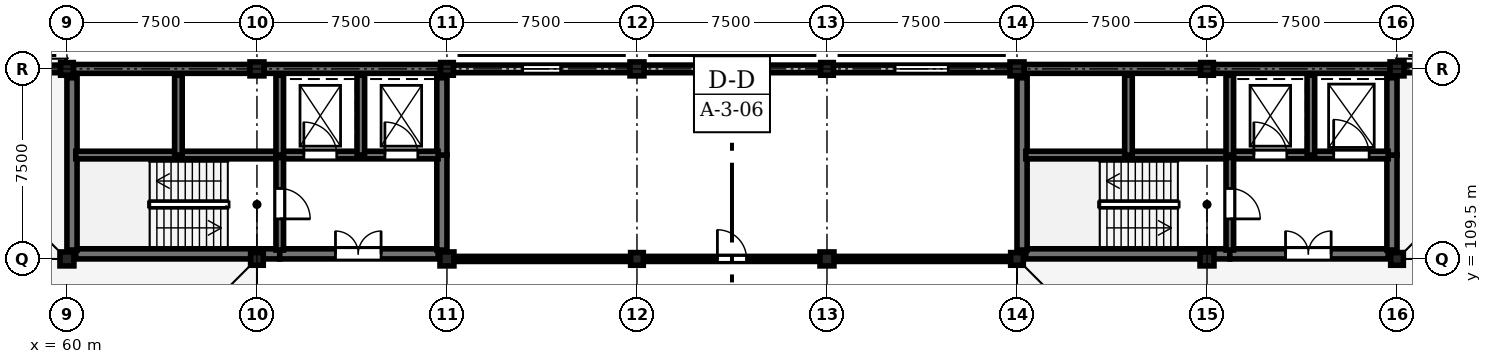
"""IFC4 building model, lengths in metres.
Left out: names, types, materials, properties, quantities, classifications, styles, units other than length and angle.
Written with IfcOpenShell. Run it as: python <this file> out.ifc"""

import sys

from ifc_helpers import new_model, si_unit, direction, frame, frame_2d, origin, origin_2d, place, context, subcontext, project, spatial, rectangle, extrude, element, fill, save


model = new_model("IFC4")
c1 = context("Model", 3, precision=1e-05, world=origin(), true_north=direction((0.0, 1.0)))
c2 = subcontext(c1, "Body", "Model", "MODEL_VIEW")
j1 = project(units=[si_unit("LENGTHUNIT", "METRE"), si_unit("PLANEANGLEUNIT", "RADIAN")], contexts=[c1])
p1 = place(None, origin())
s1 = spatial("IfcSite", under=j1, at=p1, CompositionType="ELEMENT")
p2 = place(p1, origin())
s2 = spatial("IfcBuilding", under=s1, at=p2, CompositionType="ELEMENT")
p3 = place(p2, frame((0.0, 0.0, 17.85)))
s3 = spatial("IfcBuildingStorey", under=s2, at=p3, CompositionType="ELEMENT", Elevation=17.85)
p4 = place(p3, frame((60.0, 109.5, 0.0), z_axis=(0.0, 0.0, 1.0), x_axis=(1.0, 0.0, 0.0)))
e1 = element("IfcColumn", 1, at=p4, inside=s3, PredefinedType="COLUMN", context=c2, shape_type="SweptSolid", body=[
    extrude(rectangle(XDim=0.55, YDim=0.55, at=origin_2d()), origin(), (0.0, 0.0, 1.0), 4.05),
])
for number, where, z_axis, x_axis in (
    (2, (60.0, 117.0, 0.0), (0.0, 0.0, 1.0), (1.0, 0.0, 0.0)),
    (3, (67.5, 109.5, 0.0), (0.0, 0.0, 1.0), (1.0, 0.0, 0.0)),
):
    element("IfcColumn", number, at=place(p3, frame(where, z_axis=z_axis, x_axis=x_axis)), inside=s3, PredefinedType="COLUMN", context=c2, shape_type="SweptSolid", body=[
        extrude(rectangle(XDim=0.5, YDim=0.5, at=origin_2d()), origin(), (0.0, 0.0, 1.0), 4.05),
    ])
for number, where, z_axis, x_axis in (
    (4, (67.5, 117.0, 0.0), (0.0, 0.0, 1.0), (1.0, 0.0, 0.0)),
    (5, (75.0, 109.5, 0.0), (0.0, 0.0, 1.0), (1.0, 0.0, 0.0)),
):
    element("IfcColumn", number, at=place(p3, frame(where, z_axis=z_axis, x_axis=x_axis)), inside=s3, PredefinedType="COLUMN", context=c2, shape_type="SweptSolid", body=[
        extrude(rectangle(XDim=0.55, YDim=0.55, at=origin_2d()), origin(), (0.0, 0.0, 1.0), 4.05),
    ])
for number, where, z_axis, x_axis in (
    (6, (75.0, 117.0, 0.0), (0.0, 0.0, 1.0), (1.0, 0.0, 0.0)),
    (7, (82.5, 109.5, 0.0), (0.0, 0.0, 1.0), (1.0, 0.0, 0.0)),
):
    element("IfcColumn", number, at=place(p3, frame(where, z_axis=z_axis, x_axis=x_axis)), inside=s3, PredefinedType="COLUMN", context=c2, shape_type="SweptSolid", body=[
        extrude(rectangle(XDim=0.5, YDim=0.5, at=origin_2d()), origin(), (0.0, 0.0, 1.0), 4.05),
    ])
for number, where, z_axis, x_axis in (
    (8, (82.5, 117.0, 0.0), (0.0, 0.0, 1.0), (1.0, 0.0, 0.0)),
    (9, (90.0, 109.5, 0.0), (0.0, 0.0, 1.0), (1.0, 0.0, 0.0)),
):
    element("IfcColumn", number, at=place(p3, frame(where, z_axis=z_axis, x_axis=x_axis)), inside=s3, PredefinedType="COLUMN", context=c2, shape_type="SweptSolid", body=[
        extrude(rectangle(XDim=0.55, YDim=0.55, at=origin_2d()), origin(), (0.0, 0.0, 1.0), 4.05),
    ])
for number, where, z_axis, x_axis in (
    (10, (90.0, 117.0, 0.0), (0.0, 0.0, 1.0), (1.0, 0.0, 0.0)),
    (11, (97.5, 109.5, 0.0), (0.0, 0.0, 1.0), (1.0, 0.0, 0.0)),
):
    element("IfcColumn", number, at=place(p3, frame(where, z_axis=z_axis, x_axis=x_axis)), inside=s3, PredefinedType="COLUMN", context=c2, shape_type="SweptSolid", body=[
        extrude(rectangle(XDim=0.5, YDim=0.5, at=origin_2d()), origin(), (0.0, 0.0, 1.0), 4.05),
    ])
for number, where, z_axis, x_axis in (
    (12, (97.5, 117.0, 0.0), (0.0, 0.0, 1.0), (1.0, 0.0, 0.0)),
    (13, (105.0, 109.5, 0.0), (0.0, 0.0, 1.0), (1.0, 0.0, 0.0)),
):
    element("IfcColumn", number, at=place(p3, frame(where, z_axis=z_axis, x_axis=x_axis)), inside=s3, PredefinedType="COLUMN", context=c2, shape_type="SweptSolid", body=[
        extrude(rectangle(XDim=0.55, YDim=0.55, at=origin_2d()), origin(), (0.0, 0.0, 1.0), 4.05),
    ])
for number, where, z_axis, x_axis in (
    (14, (105.0, 117.0, 0.0), (0.0, 0.0, 1.0), (1.0, 0.0, 0.0)),
    (15, (112.5, 109.5, 0.0), (0.0, 0.0, 1.0), (1.0, 0.0, 0.0)),
):
    element("IfcColumn", number, at=place(p3, frame(where, z_axis=z_axis, x_axis=x_axis)), inside=s3, PredefinedType="COLUMN", context=c2, shape_type="SweptSolid", body=[
        extrude(rectangle(XDim=0.5, YDim=0.5, at=origin_2d()), origin(), (0.0, 0.0, 1.0), 4.05),
    ])
p5 = place(p3, frame((112.5, 117.0, 0.0), z_axis=(0.0, 0.0, 1.0), x_axis=(1.0, 0.0, 0.0)))
e16 = element("IfcColumn", 16, at=p5, inside=s3, PredefinedType="COLUMN", context=c2, shape_type="SweptSolid", body=[
    extrude(rectangle(XDim=0.55, YDim=0.55, at=origin_2d()), origin(), (0.0, 0.0, 1.0), 4.05),
])
p6 = place(p3, frame((52.735, 117.0, 0.0), z_axis=(0.0, 0.0, 1.0), x_axis=(1.0, 0.0, 0.0)))
e17 = element("IfcWall", 17, at=p6, inside=s3, PredefinedType="STANDARD", context=c2, shape_type="SweptSolid", body=[
    extrude(rectangle(XDim=7.005, YDim=0.3, at=frame_2d((3.502, 0.0))), origin(), (0.0, 0.0, 1.0), 3.77),
])
p7 = place(p6, frame((2.452, 0.0, 0.9)))
e18 = element("IfcOpeningElement", 18, at=p7, cuts=e17, PredefinedType="OPENING", context=c2, shape_type="SweptSolid", body=[
    extrude(rectangle(XDim=2.1, YDim=2.4, at=frame_2d((1.05, 1.2))), frame((0.0, 0.16, 0.0), z_axis=(0.0, -1.0, 0.0), x_axis=(1.0, 0.0, 0.0)), (0.0, 0.0, 1.0), 0.32),
])
for number, where, z_axis, x_axis in (
    (19, (60.26, 117.0, 0.0), (0.0, 0.0, 1.0), (1.0, 0.0, 0.0)),
    (20, (67.785, 117.0, 0.0), (0.0, 0.0, 1.0), (1.0, 0.0, 0.0)),
):
    element("IfcWall", number, at=place(p3, frame(where, z_axis=z_axis, x_axis=x_axis)), inside=s3, PredefinedType="SHEAR", context=c2, shape_type="SweptSolid", body=[
        extrude(rectangle(XDim=6.955, YDim=0.35, at=frame_2d((3.478, 0.0))), origin(), (0.0, 0.0, 1.0), 3.77),
    ])
p8 = place(p3, frame((75.26, 117.0, 0.0), z_axis=(0.0, 0.0, 1.0), x_axis=(1.0, 0.0, 0.0)))
e21 = element("IfcWall", 21, at=p8, inside=s3, PredefinedType="STANDARD", context=c2, shape_type="SweptSolid", body=[
    extrude(rectangle(XDim=6.955, YDim=0.3, at=frame_2d((3.478, 0.0))), origin(), (0.0, 0.0, 1.0), 3.17),
])
p9 = place(p8, frame((2.728, 0.0, 0.9)))
e22 = element("IfcOpeningElement", 22, at=p9, cuts=e21, PredefinedType="OPENING", context=c2, shape_type="SweptSolid", body=[
    extrude(rectangle(XDim=1.5, YDim=1.99, at=frame_2d((0.75, 0.995))), frame((0.0, 0.16, 0.0), z_axis=(0.0, -1.0, 0.0), x_axis=(1.0, 0.0, 0.0)), (0.0, 0.0, 1.0), 0.32),
])
p10 = place(p3, frame((82.785, 117.0, 0.0), z_axis=(0.0, 0.0, 1.0), x_axis=(1.0, 0.0, 0.0)))
e23 = element("IfcWall", 23, at=p10, inside=s3, PredefinedType="STANDARD", context=c2, shape_type="SweptSolid", body=[
    extrude(rectangle(XDim=6.955, YDim=0.3, at=frame_2d((3.478, 0.0))), origin(), (0.0, 0.0, 1.0), 3.17),
])
p11 = place(p10, frame((2.877, 0.0, 0.9)))
e24 = element("IfcOpeningElement", 24, at=p11, cuts=e23, PredefinedType="OPENING", context=c2, shape_type="SweptSolid", body=[
    extrude(rectangle(XDim=1.2, YDim=1.99, at=frame_2d((0.6, 0.995))), frame((0.0, 0.16, 0.0), z_axis=(0.0, -1.0, 0.0), x_axis=(1.0, 0.0, 0.0)), (0.0, 0.0, 1.0), 0.32),
])
p12 = place(p3, frame((90.26, 117.0, 0.0), z_axis=(0.0, 0.0, 1.0), x_axis=(1.0, 0.0, 0.0)))
e25 = element("IfcWall", 25, at=p12, inside=s3, PredefinedType="STANDARD", context=c2, shape_type="SweptSolid", body=[
    extrude(rectangle(XDim=6.955, YDim=0.3, at=frame_2d((3.478, 0.0))), origin(), (0.0, 0.0, 1.0), 3.17),
])
p13 = place(p12, frame((2.427, 0.0, 0.9)))
e26 = element("IfcOpeningElement", 26, at=p13, cuts=e25, PredefinedType="OPENING", context=c2, shape_type="SweptSolid", body=[
    extrude(rectangle(XDim=2.1, YDim=1.99, at=frame_2d((1.05, 0.995))), frame((0.0, 0.16, 0.0), z_axis=(0.0, -1.0, 0.0), x_axis=(1.0, 0.0, 0.0)), (0.0, 0.0, 1.0), 0.32),
])
for number, where, z_axis, x_axis in (
    (27, (97.785, 117.0, 0.0), (0.0, 0.0, 1.0), (1.0, 0.0, 0.0)),
    (28, (105.26, 117.0, 0.0), (0.0, 0.0, 1.0), (1.0, 0.0, 0.0)),
):
    element("IfcWall", number, at=place(p3, frame(where, z_axis=z_axis, x_axis=x_axis)), inside=s3, PredefinedType="SHEAR", context=c2, shape_type="SweptSolid", body=[
        extrude(rectangle(XDim=6.955, YDim=0.35, at=frame_2d((3.478, 0.0))), origin(), (0.0, 0.0, 1.0), 3.77),
    ])
p14 = place(p3, frame((112.785, 117.0, 0.0), z_axis=(0.0, 0.0, 1.0), x_axis=(1.0, 0.0, 0.0)))
e29 = element("IfcWall", 29, at=p14, inside=s3, PredefinedType="STANDARD", context=c2, shape_type="SweptSolid", body=[
    extrude(rectangle(XDim=6.98, YDim=0.3, at=frame_2d((3.49, 0.0))), origin(), (0.0, 0.0, 1.0), 3.77),
])
p15 = place(p14, frame((2.59, 0.0, 0.9)))
e30 = element("IfcOpeningElement", 30, at=p15, cuts=e29, PredefinedType="OPENING", context=c2, shape_type="SweptSolid", body=[
    extrude(rectangle(XDim=1.8, YDim=1.95, at=frame_2d((0.9, 0.975))), frame((0.0, 0.16, 0.0), z_axis=(0.0, -1.0, 0.0), x_axis=(1.0, 0.0, 0.0)), (0.0, 0.0, 1.0), 0.32),
])
p16 = place(p3, frame((60.35, 109.7, 0.0), z_axis=(0.0, 0.0, 1.0), x_axis=(1.0, 0.0, 0.0)))
e31 = element("IfcWall", 31, at=p16, inside=s3, PredefinedType="SHEAR", context=c2, shape_type="SweptSolid", body=[
    extrude(rectangle(XDim=8.05, YDim=0.4, at=frame_2d((4.025, 0.0))), origin(), (0.0, 0.0, 1.0), 3.77),
])
p17 = place(p3, frame((68.4, 109.7, 0.0), z_axis=(0.0, 0.0, 1.0), x_axis=(1.0, 0.0, 0.0)))
e32 = element("IfcWall", 32, at=p17, inside=s3, PredefinedType="SHEAR", context=c2, shape_type="SweptSolid", body=[
    extrude(rectangle(XDim=6.25, YDim=0.4, at=frame_2d((3.125, 0.0))), origin(), (0.0, 0.0, 1.0), 3.77),
])
p18 = place(p17, frame((2.2, 0.0, 0.0)))
e33 = element("IfcOpeningElement", 33, at=p18, cuts=e32, PredefinedType="OPENING", context=c2, shape_type="SweptSolid", body=[
    extrude(rectangle(XDim=1.8, YDim=2.25, at=frame_2d((0.9, 1.125))), frame((0.0, 0.21, 0.0), z_axis=(0.0, -1.0, 0.0), x_axis=(1.0, 0.0, 0.0)), (0.0, 0.0, 1.0), 0.42),
])
p19 = place(p3, frame((60.2, 109.85, 0.0), z_axis=(0.0, 0.0, 1.0), x_axis=(0.0, 1.0, 0.0)))
e34 = element("IfcWall", 34, at=p19, inside=s3, PredefinedType="SHEAR", context=c2, shape_type="SweptSolid", body=[
    extrude(rectangle(XDim=6.8, YDim=0.4, at=frame_2d((3.4, 0.0))), origin(), (0.0, 0.0, 1.0), 3.77),
])
p20 = place(p3, frame((74.8, 109.85, 0.0), z_axis=(0.0, 0.0, 1.0), x_axis=(0.0, 1.0, 0.0)))
e35 = element("IfcWall", 35, at=p20, inside=s3, PredefinedType="SHEAR", context=c2, shape_type="SweptSolid", body=[
    extrude(rectangle(XDim=3.75, YDim=0.4, at=frame_2d((1.875, 0.0))), origin(), (0.0, 0.0, 1.0), 3.77),
])
p21 = place(p3, frame((74.8, 113.6, 0.0), z_axis=(0.0, 0.0, 1.0), x_axis=(0.0, 1.0, 0.0)))
e36 = element("IfcWall", 36, at=p21, inside=s3, PredefinedType="SHEAR", context=c2, shape_type="SweptSolid", body=[
    extrude(rectangle(XDim=3.05, YDim=0.4, at=frame_2d((1.525, 0.0))), origin(), (0.0, 0.0, 1.0), 3.77),
])
p22 = place(p3, frame((60.35, 113.6, 0.0), z_axis=(0.0, 0.0, 1.0), x_axis=(1.0, 0.0, 0.0)))
e37 = element("IfcWall", 37, at=p22, inside=s3, PredefinedType="SHEAR", context=c2, shape_type="SweptSolid", body=[
    extrude(rectangle(XDim=8.05, YDim=0.3, at=frame_2d((4.025, 0.0))), origin(), (0.0, 0.0, 1.0), 3.77),
])
p23 = place(p3, frame((68.4, 113.6, 0.0), z_axis=(0.0, 0.0, 1.0), x_axis=(1.0, 0.0, 0.0)))
e38 = element("IfcWall", 38, at=p23, inside=s3, PredefinedType="SHEAR", context=c2, shape_type="SweptSolid", body=[
    extrude(rectangle(XDim=6.25, YDim=0.3, at=frame_2d((3.125, 0.0))), origin(), (0.0, 0.0, 1.0), 3.77),
])
p24 = place(p23, frame((0.95, 0.0, 0.0)))
e39 = element("IfcOpeningElement", 39, at=p24, cuts=e38, PredefinedType="OPENING", context=c2, shape_type="SweptSolid", body=[
    extrude(rectangle(XDim=1.3, YDim=2.2, at=frame_2d((0.65, 1.1))), frame((0.0, 0.16, 0.0), z_axis=(0.0, -1.0, 0.0), x_axis=(1.0, 0.0, 0.0)), (0.0, 0.0, 1.0), 0.32),
])
p25 = place(p23, frame((4.15, 0.0, 0.0)))
e40 = element("IfcOpeningElement", 40, at=p25, cuts=e38, PredefinedType="OPENING", context=c2, shape_type="SweptSolid", body=[
    extrude(rectangle(XDim=1.3, YDim=2.2, at=frame_2d((0.65, 1.1))), frame((0.0, 0.16, 0.0), z_axis=(0.0, -1.0, 0.0), x_axis=(1.0, 0.0, 0.0)), (0.0, 0.0, 1.0), 0.32),
])
p26 = place(p3, frame((68.4, 113.5, 0.0), z_axis=(0.0, 0.0, 1.0), x_axis=(0.0, -1.0, 0.0)))
e41 = element("IfcWall", 41, at=p26, inside=s3, PredefinedType="SHEAR", context=c2, shape_type="SweptSolid", body=[
    extrude(rectangle(XDim=3.65, YDim=0.3, at=frame_2d((1.825, 0.0))), origin(), (0.0, 0.0, 1.0), 3.77),
])
p27 = place(p26, frame((1.22, 0.0, 0.0)))
e42 = element("IfcOpeningElement", 42, at=p27, cuts=e41, PredefinedType="OPENING", context=c2, shape_type="SweptSolid", body=[
    extrude(rectangle(XDim=1.2, YDim=2.25, at=frame_2d((0.6, 1.125))), frame((0.0, 0.16, 0.0), z_axis=(0.0, -1.0, 0.0), x_axis=(1.0, 0.0, 0.0)), (0.0, 0.0, 1.0), 0.32),
])
for number, where, z_axis, x_axis in (
    (43, (64.4, 113.6, 0.0), (0.0, 0.0, 1.0), (0.0, 1.0, 0.0)),
    (44, (68.4, 113.6, 0.0), (0.0, 0.0, 1.0), (0.0, 1.0, 0.0)),
    (45, (71.6, 113.6, 0.0), (0.0, 0.0, 1.0), (0.0, 1.0, 0.0)),
):
    element("IfcWall", number, at=place(p3, frame(where, z_axis=z_axis, x_axis=x_axis)), inside=s3, PredefinedType="SHEAR", context=c2, shape_type="SweptSolid", body=[
        extrude(rectangle(XDim=3.15, YDim=0.3, at=frame_2d((1.575, 0.0))), origin(), (0.0, 0.0, 1.0), 3.77),
    ])
p28 = place(p3, frame((97.85, 109.7, 0.0), z_axis=(0.0, 0.0, 1.0), x_axis=(1.0, 0.0, 0.0)))
e46 = element("IfcWall", 46, at=p28, inside=s3, PredefinedType="SHEAR", context=c2, shape_type="SweptSolid", body=[
    extrude(rectangle(XDim=8.05, YDim=0.4, at=frame_2d((4.025, 0.0))), origin(), (0.0, 0.0, 1.0), 3.77),
])
p29 = place(p3, frame((105.9, 109.7, 0.0), z_axis=(0.0, 0.0, 1.0), x_axis=(1.0, 0.0, 0.0)))
e47 = element("IfcWall", 47, at=p29, inside=s3, PredefinedType="SHEAR", context=c2, shape_type="SweptSolid", body=[
    extrude(rectangle(XDim=6.25, YDim=0.4, at=frame_2d((3.125, 0.0))), origin(), (0.0, 0.0, 1.0), 3.77),
])
p30 = place(p29, frame((2.2, 0.0, 0.0)))
e48 = element("IfcOpeningElement", 48, at=p30, cuts=e47, PredefinedType="OPENING", context=c2, shape_type="SweptSolid", body=[
    extrude(rectangle(XDim=1.8, YDim=2.25, at=frame_2d((0.9, 1.125))), frame((0.0, 0.21, 0.0), z_axis=(0.0, -1.0, 0.0), x_axis=(1.0, 0.0, 0.0)), (0.0, 0.0, 1.0), 0.42),
])
p31 = place(p3, frame((97.7, 109.85, 0.0), z_axis=(0.0, 0.0, 1.0), x_axis=(0.0, 1.0, 0.0)))
e49 = element("IfcWall", 49, at=p31, inside=s3, PredefinedType="SHEAR", context=c2, shape_type="SweptSolid", body=[
    extrude(rectangle(XDim=6.8, YDim=0.4, at=frame_2d((3.4, 0.0))), origin(), (0.0, 0.0, 1.0), 3.77),
])
p32 = place(p3, frame((112.3, 109.85, 0.0), z_axis=(0.0, 0.0, 1.0), x_axis=(0.0, 1.0, 0.0)))
e50 = element("IfcWall", 50, at=p32, inside=s3, PredefinedType="SHEAR", context=c2, shape_type="SweptSolid", body=[
    extrude(rectangle(XDim=3.75, YDim=0.4, at=frame_2d((1.875, 0.0))), origin(), (0.0, 0.0, 1.0), 3.77),
])
p33 = place(p3, frame((112.3, 113.6, 0.0), z_axis=(0.0, 0.0, 1.0), x_axis=(0.0, 1.0, 0.0)))
e51 = element("IfcWall", 51, at=p33, inside=s3, PredefinedType="SHEAR", context=c2, shape_type="SweptSolid", body=[
    extrude(rectangle(XDim=3.05, YDim=0.4, at=frame_2d((1.525, 0.0))), origin(), (0.0, 0.0, 1.0), 3.77),
])
p34 = place(p3, frame((97.85, 113.6, 0.0), z_axis=(0.0, 0.0, 1.0), x_axis=(1.0, 0.0, 0.0)))
e52 = element("IfcWall", 52, at=p34, inside=s3, PredefinedType="SHEAR", context=c2, shape_type="SweptSolid", body=[
    extrude(rectangle(XDim=8.05, YDim=0.3, at=frame_2d((4.025, 0.0))), origin(), (0.0, 0.0, 1.0), 3.77),
])
p35 = place(p3, frame((105.9, 113.6, 0.0), z_axis=(0.0, 0.0, 1.0), x_axis=(1.0, 0.0, 0.0)))
e53 = element("IfcWall", 53, at=p35, inside=s3, PredefinedType="SHEAR", context=c2, shape_type="SweptSolid", body=[
    extrude(rectangle(XDim=6.25, YDim=0.3, at=frame_2d((3.125, 0.0))), origin(), (0.0, 0.0, 1.0), 3.77),
])
p36 = place(p35, frame((0.95, 0.0, 0.0)))
e54 = element("IfcOpeningElement", 54, at=p36, cuts=e53, PredefinedType="OPENING", context=c2, shape_type="SweptSolid", body=[
    extrude(rectangle(XDim=1.3, YDim=2.2, at=frame_2d((0.65, 1.1))), frame((0.0, 0.16, 0.0), z_axis=(0.0, -1.0, 0.0), x_axis=(1.0, 0.0, 0.0)), (0.0, 0.0, 1.0), 0.32),
])
p37 = place(p35, frame((4.1, 0.0, 0.0)))
e55 = element("IfcOpeningElement", 55, at=p37, cuts=e53, PredefinedType="OPENING", context=c2, shape_type="SweptSolid", body=[
    extrude(rectangle(XDim=1.4, YDim=2.25, at=frame_2d((0.7, 1.125))), frame((0.0, 0.16, 0.0), z_axis=(0.0, -1.0, 0.0), x_axis=(1.0, 0.0, 0.0)), (0.0, 0.0, 1.0), 0.32),
])
p38 = place(p3, frame((105.9, 113.5, 0.0), z_axis=(0.0, 0.0, 1.0), x_axis=(0.0, -1.0, 0.0)))
e56 = element("IfcWall", 56, at=p38, inside=s3, PredefinedType="SHEAR", context=c2, shape_type="SweptSolid", body=[
    extrude(rectangle(XDim=3.65, YDim=0.3, at=frame_2d((1.825, 0.0))), origin(), (0.0, 0.0, 1.0), 3.77),
])
p39 = place(p38, frame((1.22, 0.0, 0.0)))
e57 = element("IfcOpeningElement", 57, at=p39, cuts=e56, PredefinedType="OPENING", context=c2, shape_type="SweptSolid", body=[
    extrude(rectangle(XDim=1.2, YDim=2.25, at=frame_2d((0.6, 1.125))), frame((0.0, 0.16, 0.0), z_axis=(0.0, -1.0, 0.0), x_axis=(1.0, 0.0, 0.0)), (0.0, 0.0, 1.0), 0.32),
])
for number, where, z_axis, x_axis in (
    (58, (101.9, 113.6, 0.0), (0.0, 0.0, 1.0), (0.0, 1.0, 0.0)),
    (59, (105.9, 113.6, 0.0), (0.0, 0.0, 1.0), (0.0, 1.0, 0.0)),
    (60, (109.1, 113.6, 0.0), (0.0, 0.0, 1.0), (0.0, 1.0, 0.0)),
):
    element("IfcWall", number, at=place(p3, frame(where, z_axis=z_axis, x_axis=x_axis)), inside=s3, PredefinedType="SHEAR", context=c2, shape_type="SweptSolid", body=[
        extrude(rectangle(XDim=3.15, YDim=0.3, at=frame_2d((1.575, 0.0))), origin(), (0.0, 0.0, 1.0), 3.77),
    ])
p40 = place(p3, frame((75.3, 109.5, 0.0), z_axis=(0.0, 0.0, 1.0), x_axis=(1.0, 0.0, 0.0)))
e61 = element("IfcWall", 61, at=p40, inside=s3, PredefinedType="STANDARD", context=c2, shape_type="SweptSolid", body=[
    extrude(rectangle(XDim=21.9, YDim=0.2, at=frame_2d((10.95, 0.0))), origin(), (0.0, 0.0, 1.0), 3.015),
])
p41 = place(p40, frame((10.375, 0.0, 0.0)))
e62 = element("IfcOpeningElement", 62, at=p41, cuts=e61, PredefinedType="OPENING", context=c2, shape_type="SweptSolid", body=[
    extrude(rectangle(XDim=1.15, YDim=2.2, at=frame_2d((0.575, 1.1))), frame((0.0, 0.11, 0.0), z_axis=(0.0, -1.0, 0.0), x_axis=(1.0, 0.0, 0.0)), (0.0, 0.0, 1.0), 0.22),
])
p42 = place(p9, origin())
e63 = element("IfcWindow", 63, at=p42, inside=s3, PartitioningType="SINGLE_PANEL", PredefinedType="WINDOW", context=c2, shape_type="SweptSolid", body=[
    extrude(rectangle(XDim=1.5, YDim=1.99, at=frame_2d((0.75, 0.995))), frame((0.0, 0.03, 0.0), z_axis=(0.0, -1.0, 0.0), x_axis=(1.0, 0.0, 0.0)), (0.0, 0.0, 1.0), 0.06),
])
fill(e22, e63)
p43 = place(p11, origin())
e64 = element("IfcWindow", 64, at=p43, inside=s3, PartitioningType="SINGLE_PANEL", PredefinedType="WINDOW", context=c2, shape_type="SweptSolid", body=[
    extrude(rectangle(XDim=1.2, YDim=1.99, at=frame_2d((0.6, 0.995))), frame((0.0, 0.03, 0.0), z_axis=(0.0, -1.0, 0.0), x_axis=(1.0, 0.0, 0.0)), (0.0, 0.0, 1.0), 0.06),
])
fill(e24, e64)
p44 = place(p13, origin())
e65 = element("IfcWindow", 65, at=p44, inside=s3, PartitioningType="SINGLE_PANEL", PredefinedType="WINDOW", context=c2, shape_type="SweptSolid", body=[
    extrude(rectangle(XDim=2.1, YDim=1.99, at=frame_2d((1.05, 0.995))), frame((0.0, 0.03, 0.0), z_axis=(0.0, -1.0, 0.0), x_axis=(1.0, 0.0, 0.0)), (0.0, 0.0, 1.0), 0.06),
])
fill(e26, e65)
p45 = place(p18, origin())
e66 = element("IfcDoor", 66, at=p45, inside=s3, OperationType="DOUBLE_DOOR_SINGLE_SWING", PredefinedType="DOOR", context=c2, shape_type="SweptSolid", body=[
    extrude(rectangle(XDim=1.8, YDim=2.25, at=frame_2d((0.9, 1.125))), frame((0.0, 0.025, 0.0), z_axis=(0.0, -1.0, 0.0), x_axis=(1.0, 0.0, 0.0)), (0.0, 0.0, 1.0), 0.05),
])
fill(e33, e66)
p46 = place(p24, origin())
e67 = element("IfcDoor", 67, at=p46, inside=s3, OperationType="DOUBLE_DOOR_SLIDING", PredefinedType="DOOR", context=c2, shape_type="SweptSolid", body=[
    extrude(rectangle(XDim=1.3, YDim=2.2, at=frame_2d((0.65, 1.1))), frame((0.0, 0.025, 0.0), z_axis=(0.0, -1.0, 0.0), x_axis=(1.0, 0.0, 0.0)), (0.0, 0.0, 1.0), 0.05),
])
fill(e39, e67)
p47 = place(p25, origin())
e68 = element("IfcDoor", 68, at=p47, inside=s3, OperationType="DOUBLE_DOOR_SLIDING", PredefinedType="DOOR", context=c2, shape_type="SweptSolid", body=[
    extrude(rectangle(XDim=1.3, YDim=2.2, at=frame_2d((0.65, 1.1))), frame((0.0, 0.025, 0.0), z_axis=(0.0, -1.0, 0.0), x_axis=(1.0, 0.0, 0.0)), (0.0, 0.0, 1.0), 0.05),
])
fill(e40, e68)
p48 = place(p27, origin())
e69 = element("IfcDoor", 69, at=p48, inside=s3, OperationType="SINGLE_SWING_RIGHT", PredefinedType="DOOR", context=c2, shape_type="SweptSolid", body=[
    extrude(rectangle(XDim=1.2, YDim=2.25, at=frame_2d((0.6, 1.125))), frame((0.0, 0.025, 0.0), z_axis=(0.0, -1.0, 0.0), x_axis=(1.0, 0.0, 0.0)), (0.0, 0.0, 1.0), 0.05),
])
fill(e42, e69)
p49 = place(p30, origin())
e70 = element("IfcDoor", 70, at=p49, inside=s3, OperationType="DOUBLE_DOOR_SINGLE_SWING", PredefinedType="DOOR", context=c2, shape_type="SweptSolid", body=[
    extrude(rectangle(XDim=1.8, YDim=2.25, at=frame_2d((0.9, 1.125))), frame((0.0, 0.025, 0.0), z_axis=(0.0, -1.0, 0.0), x_axis=(1.0, 0.0, 0.0)), (0.0, 0.0, 1.0), 0.05),
])
fill(e48, e70)
p50 = place(p36, origin())
e71 = element("IfcDoor", 71, at=p50, inside=s3, OperationType="DOUBLE_DOOR_SLIDING", PredefinedType="DOOR", context=c2, shape_type="SweptSolid", body=[
    extrude(rectangle(XDim=1.3, YDim=2.2, at=frame_2d((0.65, 1.1))), frame((0.0, 0.025, 0.0), z_axis=(0.0, -1.0, 0.0), x_axis=(1.0, 0.0, 0.0)), (0.0, 0.0, 1.0), 0.05),
])
fill(e54, e71)
p51 = place(p37, origin())
e72 = element("IfcDoor", 72, at=p51, inside=s3, OperationType="DOUBLE_DOOR_SLIDING", PredefinedType="DOOR", context=c2, shape_type="SweptSolid", body=[
    extrude(rectangle(XDim=1.4, YDim=2.25, at=frame_2d((0.7, 1.125))), frame((0.0, 0.025, 0.0), z_axis=(0.0, -1.0, 0.0), x_axis=(1.0, 0.0, 0.0)), (0.0, 0.0, 1.0), 0.05),
])
fill(e55, e72)
p52 = place(p39, origin())
e73 = element("IfcDoor", 73, at=p52, inside=s3, OperationType="SINGLE_SWING_RIGHT", PredefinedType="DOOR", context=c2, shape_type="SweptSolid", body=[
    extrude(rectangle(XDim=1.2, YDim=2.25, at=frame_2d((0.6, 1.125))), frame((0.0, 0.025, 0.0), z_axis=(0.0, -1.0, 0.0), x_axis=(1.0, 0.0, 0.0)), (0.0, 0.0, 1.0), 0.05),
])
fill(e57, e73)
p53 = place(p41, origin())
e74 = element("IfcDoor", 74, at=p53, inside=s3, OperationType="SINGLE_SWING_LEFT", PredefinedType="DOOR", context=c2, shape_type="SweptSolid", body=[
    extrude(rectangle(XDim=1.15, YDim=2.2, at=frame_2d((0.575, 1.1))), frame((0.0, 0.025, 0.0), z_axis=(0.0, -1.0, 0.0), x_axis=(1.0, 0.0, 0.0)), (0.0, 0.0, 1.0), 0.05),
])
fill(e62, e74)
save(model, sys.argv[1])
